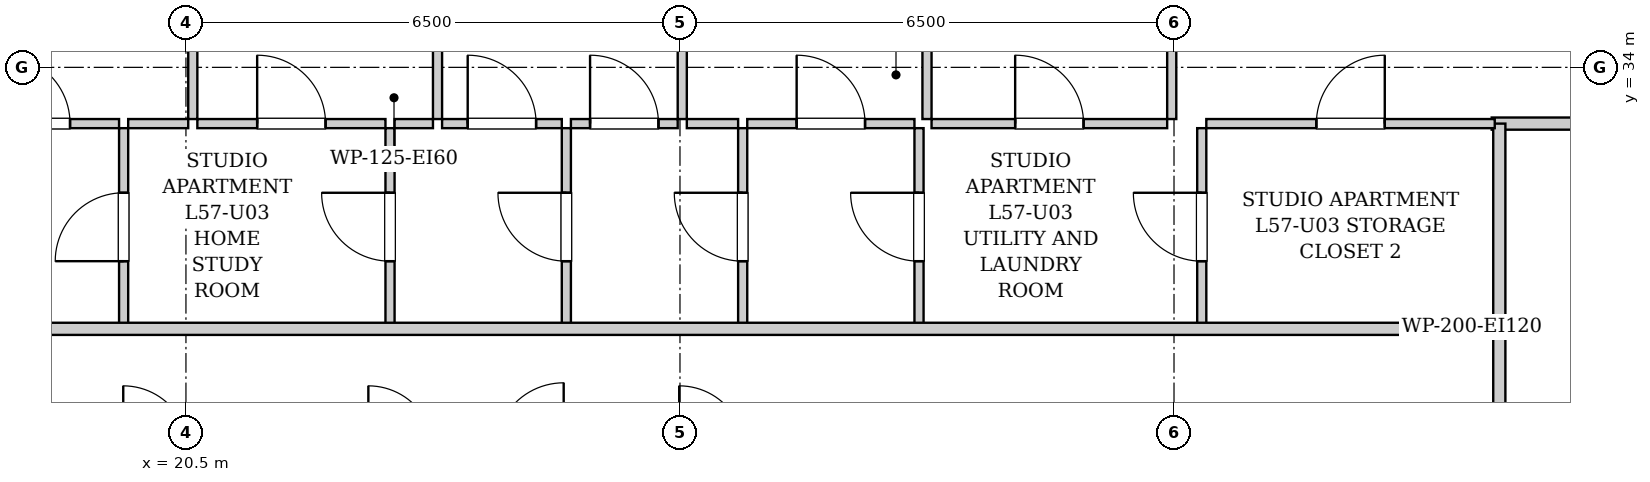
"""IFC4 building model, lengths in metres.
Left out: names, types, materials, properties, quantities, classifications, styles, units other than length and angle.
Written with IfcOpenShell. Run it as: python <this file> out.ifc"""

import sys

from ifc_helpers import new_model, si_unit, direction, frame, frame_2d, origin, place, context, subcontext, project, spatial, rectangle, extrude, element, fill, save


model = new_model("IFC4")
c1 = context("Model", 3, precision=1e-05, world=origin(), true_north=direction((0.0, 1.0)))
c2 = subcontext(c1, "Body", "Model", "MODEL_VIEW")
j1 = project(units=[si_unit("LENGTHUNIT", "METRE"), si_unit("PLANEANGLEUNIT", "RADIAN")], contexts=[c1])
p1 = place(None, origin())
s1 = spatial("IfcSite", under=j1, at=p1, CompositionType="ELEMENT")
p2 = place(p1, origin())
s2 = spatial("IfcBuilding", under=s1, at=p2, CompositionType="ELEMENT")
p3 = place(p2, frame((0.0, 0.0, 197.5)))
s3 = spatial("IfcBuildingStorey", under=s2, at=p3, CompositionType="ELEMENT", Elevation=197.5)
p4 = place(p3, frame((37.78, 28.98, 0.0), z_axis=(0.0, 0.0, 1.0), x_axis=(0.0, 1.0, 0.0)))
e1 = element("IfcWall", 1, at=p4, inside=s3, PredefinedType="PARTITIONING", context=c2, shape_type="SweptSolid", body=[
    extrude(rectangle(XDim=1.58, YDim=0.16, at=frame_2d((0.79, 0.0))), origin(), (0.0, 0.0, 1.0), 3.04),
])
p5 = place(p3, frame((37.68, 33.26, 0.0), z_axis=(0.0, 0.0, 1.0), x_axis=(1.0, 0.0, 0.0)))
e2 = element("IfcWall", 2, at=p5, inside=s3, PredefinedType="PARTITIONING", context=c2, shape_type="SweptSolid", body=[
    extrude(rectangle(XDim=2.34, YDim=0.16, at=frame_2d((1.17, 0.0))), origin(), (0.0, 0.0, 1.0), 3.04),
])
p6 = place(p3, frame((37.78, 30.6, 0.0), z_axis=(0.0, 0.0, 1.0), x_axis=(0.0, 1.0, 0.0)))
e3 = element("IfcWall", 3, at=p6, inside=s3, PredefinedType="PARTITIONING", context=c2, shape_type="SweptSolid", body=[
    extrude(rectangle(XDim=2.66, YDim=0.16, at=frame_2d((1.33, 0.0))), origin(), (0.0, 0.0, 1.0), 3.04),
])
p7 = place(p3, frame((19.68, 30.6, 0.0), z_axis=(0.0, 0.0, 1.0), x_axis=(0.0, 1.0, 0.0)))
e4 = element("IfcWall", 4, at=p7, inside=s3, PredefinedType="PARTITIONING", context=c2, shape_type="SweptSolid", body=[
    extrude(rectangle(XDim=2.6, YDim=0.12, at=frame_2d((1.3, 0.0))), origin(), (0.0, 0.0, 1.0), 3.04),
])
p8 = place(p7, frame((0.85, 0.0, 0.0)))
e5 = element("IfcOpeningElement", 5, at=p8, cuts=e4, PredefinedType="OPENING", context=c2, shape_type="SweptSolid", body=[
    extrude(rectangle(XDim=0.9, YDim=2.05, at=frame_2d((0.45, 1.025))), frame((0.0, 0.07, 0.0), z_axis=(0.0, -1.0, 0.0), x_axis=(1.0, 0.0, 0.0)), (0.0, 0.0, 1.0), 0.14),
])
p9 = place(p3, frame((17.43, 33.26, 0.0), z_axis=(0.0, 0.0, 1.0), x_axis=(1.0, 0.0, 0.0)))
e6 = element("IfcWall", 6, at=p9, inside=s3, PredefinedType="PARTITIONING", context=c2, shape_type="SweptSolid", body=[
    extrude(rectangle(XDim=2.19, YDim=0.12, at=frame_2d((1.095, 0.0))), origin(), (0.0, 0.0, 1.0), 3.04),
])
p10 = place(p9, frame((0.645, 0.0, 0.0)))
e7 = element("IfcOpeningElement", 7, at=p10, cuts=e6, PredefinedType="OPENING", context=c2, shape_type="SweptSolid", body=[
    extrude(rectangle(XDim=0.9, YDim=2.05, at=frame_2d((0.45, 1.025))), frame((0.0, 0.07, 0.0), z_axis=(0.0, -1.0, 0.0), x_axis=(1.0, 0.0, 0.0)), (0.0, 0.0, 1.0), 0.14),
])
p11 = place(p3, frame((23.185, 30.6, 0.0), z_axis=(0.0, 0.0, 1.0), x_axis=(0.0, 1.0, 0.0)))
e8 = element("IfcWall", 8, at=p11, inside=s3, PredefinedType="PARTITIONING", context=c2, shape_type="SweptSolid", body=[
    extrude(rectangle(XDim=2.6, YDim=0.12, at=frame_2d((1.3, 0.0))), origin(), (0.0, 0.0, 1.0), 3.04),
])
p12 = place(p11, frame((0.85, 0.0, 0.0)))
e9 = element("IfcOpeningElement", 9, at=p12, cuts=e8, PredefinedType="OPENING", context=c2, shape_type="SweptSolid", body=[
    extrude(rectangle(XDim=0.9, YDim=2.05, at=frame_2d((0.45, 1.025))), frame((0.0, 0.07, 0.0), z_axis=(0.0, -1.0, 0.0), x_axis=(1.0, 0.0, 0.0)), (0.0, 0.0, 1.0), 0.14),
])
p13 = place(p3, frame((19.74, 33.26, 0.0), z_axis=(0.0, 0.0, 1.0), x_axis=(1.0, 0.0, 0.0)))
e10 = element("IfcWall", 10, at=p13, inside=s3, PredefinedType="PARTITIONING", context=c2, shape_type="SweptSolid", body=[
    extrude(rectangle(XDim=0.79, YDim=0.12, at=frame_2d((0.395, 0.0))), origin(), (0.0, 0.0, 1.0), 3.04),
])
p14 = place(p3, frame((20.65, 33.26, 0.0), z_axis=(0.0, 0.0, 1.0), x_axis=(1.0, 0.0, 0.0)))
e11 = element("IfcWall", 11, at=p14, inside=s3, PredefinedType="PARTITIONING", context=c2, shape_type="SweptSolid", body=[
    extrude(rectangle(XDim=2.475, YDim=0.12, at=frame_2d((1.238, 0.0))), origin(), (0.0, 0.0, 1.0), 3.04),
])
p15 = place(p14, frame((0.787, 0.0, 0.0)))
e12 = element("IfcOpeningElement", 12, at=p15, cuts=e11, PredefinedType="OPENING", context=c2, shape_type="SweptSolid", body=[
    extrude(rectangle(XDim=0.9, YDim=2.05, at=frame_2d((0.45, 1.025))), frame((0.0, 0.07, 0.0), z_axis=(0.0, -1.0, 0.0), x_axis=(1.0, 0.0, 0.0)), (0.0, 0.0, 1.0), 0.14),
])
p16 = place(p3, frame((25.505, 30.6, 0.0), z_axis=(0.0, 0.0, 1.0), x_axis=(0.0, 1.0, 0.0)))
e13 = element("IfcWall", 13, at=p16, inside=s3, PredefinedType="PARTITIONING", context=c2, shape_type="SweptSolid", body=[
    extrude(rectangle(XDim=2.6, YDim=0.12, at=frame_2d((1.3, 0.0))), origin(), (0.0, 0.0, 1.0), 3.04),
])
p17 = place(p16, frame((0.85, 0.0, 0.0)))
e14 = element("IfcOpeningElement", 14, at=p17, cuts=e13, PredefinedType="OPENING", context=c2, shape_type="SweptSolid", body=[
    extrude(rectangle(XDim=0.9, YDim=2.05, at=frame_2d((0.45, 1.025))), frame((0.0, 0.07, 0.0), z_axis=(0.0, -1.0, 0.0), x_axis=(1.0, 0.0, 0.0)), (0.0, 0.0, 1.0), 0.14),
])
p18 = place(p3, frame((23.245, 33.26, 0.0), z_axis=(0.0, 0.0, 1.0), x_axis=(1.0, 0.0, 0.0)))
e15 = element("IfcWall", 15, at=p18, inside=s3, PredefinedType="PARTITIONING", context=c2, shape_type="SweptSolid", body=[
    extrude(rectangle(XDim=0.505, YDim=0.12, at=frame_2d((0.252, 0.0))), origin(), (0.0, 0.0, 1.0), 3.04),
])
p19 = place(p3, frame((23.87, 33.26, 0.0), z_axis=(0.0, 0.0, 1.0), x_axis=(1.0, 0.0, 0.0)))
e16 = element("IfcWall", 16, at=p19, inside=s3, PredefinedType="PARTITIONING", context=c2, shape_type="SweptSolid", body=[
    extrude(rectangle(XDim=1.575, YDim=0.12, at=frame_2d((0.788, 0.0))), origin(), (0.0, 0.0, 1.0), 3.04),
])
p20 = place(p19, frame((0.337, 0.0, 0.0)))
e17 = element("IfcOpeningElement", 17, at=p20, cuts=e16, PredefinedType="OPENING", context=c2, shape_type="SweptSolid", body=[
    extrude(rectangle(XDim=0.9, YDim=2.05, at=frame_2d((0.45, 1.025))), frame((0.0, 0.07, 0.0), z_axis=(0.0, -1.0, 0.0), x_axis=(1.0, 0.0, 0.0)), (0.0, 0.0, 1.0), 0.14),
])
p21 = place(p3, frame((27.825, 30.6, 0.0), z_axis=(0.0, 0.0, 1.0), x_axis=(0.0, 1.0, 0.0)))
e18 = element("IfcWall", 18, at=p21, inside=s3, PredefinedType="PARTITIONING", context=c2, shape_type="SweptSolid", body=[
    extrude(rectangle(XDim=2.6, YDim=0.12, at=frame_2d((1.3, 0.0))), origin(), (0.0, 0.0, 1.0), 3.04),
])
p22 = place(p21, frame((0.85, 0.0, 0.0)))
e19 = element("IfcOpeningElement", 19, at=p22, cuts=e18, PredefinedType="OPENING", context=c2, shape_type="SweptSolid", body=[
    extrude(rectangle(XDim=0.9, YDim=2.05, at=frame_2d((0.45, 1.025))), frame((0.0, 0.07, 0.0), z_axis=(0.0, -1.0, 0.0), x_axis=(1.0, 0.0, 0.0)), (0.0, 0.0, 1.0), 0.14),
])
p23 = place(p3, frame((25.565, 33.26, 0.0), z_axis=(0.0, 0.0, 1.0), x_axis=(1.0, 0.0, 0.0)))
e20 = element("IfcWall", 20, at=p23, inside=s3, PredefinedType="PARTITIONING", context=c2, shape_type="SweptSolid", body=[
    extrude(rectangle(XDim=1.405, YDim=0.12, at=frame_2d((0.703, 0.0))), origin(), (0.0, 0.0, 1.0), 3.04),
])
p24 = place(p23, frame((0.252, 0.0, 0.0)))
e21 = element("IfcOpeningElement", 21, at=p24, cuts=e20, PredefinedType="OPENING", context=c2, shape_type="SweptSolid", body=[
    extrude(rectangle(XDim=0.9, YDim=2.05, at=frame_2d((0.45, 1.025))), frame((0.0, 0.07, 0.0), z_axis=(0.0, -1.0, 0.0), x_axis=(1.0, 0.0, 0.0)), (0.0, 0.0, 1.0), 0.14),
])
p25 = place(p3, frame((27.09, 33.26, 0.0), z_axis=(0.0, 0.0, 1.0), x_axis=(1.0, 0.0, 0.0)))
e22 = element("IfcWall", 22, at=p25, inside=s3, PredefinedType="PARTITIONING", context=c2, shape_type="SweptSolid", body=[
    extrude(rectangle(XDim=0.675, YDim=0.12, at=frame_2d((0.337, 0.0))), origin(), (0.0, 0.0, 1.0), 3.04),
])
p26 = place(p3, frame((30.145, 30.6, 0.0), z_axis=(0.0, 0.0, 1.0), x_axis=(0.0, 1.0, 0.0)))
e23 = element("IfcWall", 23, at=p26, inside=s3, PredefinedType="PARTITIONING", context=c2, shape_type="SweptSolid", body=[
    extrude(rectangle(XDim=2.6, YDim=0.12, at=frame_2d((1.3, 0.0))), origin(), (0.0, 0.0, 1.0), 3.04),
])
p27 = place(p26, frame((0.85, 0.0, 0.0)))
e24 = element("IfcOpeningElement", 24, at=p27, cuts=e23, PredefinedType="OPENING", context=c2, shape_type="SweptSolid", body=[
    extrude(rectangle(XDim=0.9, YDim=2.05, at=frame_2d((0.45, 1.025))), frame((0.0, 0.07, 0.0), z_axis=(0.0, -1.0, 0.0), x_axis=(1.0, 0.0, 0.0)), (0.0, 0.0, 1.0), 0.14),
])
p28 = place(p3, frame((27.885, 33.26, 0.0), z_axis=(0.0, 0.0, 1.0), x_axis=(1.0, 0.0, 0.0)))
e25 = element("IfcWall", 25, at=p28, inside=s3, PredefinedType="PARTITIONING", context=c2, shape_type="SweptSolid", body=[
    extrude(rectangle(XDim=2.2, YDim=0.12, at=frame_2d((1.1, 0.0))), origin(), (0.0, 0.0, 1.0), 3.04),
])
p29 = place(p28, frame((0.65, 0.0, 0.0)))
e26 = element("IfcOpeningElement", 26, at=p29, cuts=e25, PredefinedType="OPENING", context=c2, shape_type="SweptSolid", body=[
    extrude(rectangle(XDim=0.9, YDim=2.05, at=frame_2d((0.45, 1.025))), frame((0.0, 0.07, 0.0), z_axis=(0.0, -1.0, 0.0), x_axis=(1.0, 0.0, 0.0)), (0.0, 0.0, 1.0), 0.14),
])
p30 = place(p3, frame((33.865, 30.6, 0.0), z_axis=(0.0, 0.0, 1.0), x_axis=(0.0, 1.0, 0.0)))
e27 = element("IfcWall", 27, at=p30, inside=s3, PredefinedType="PARTITIONING", context=c2, shape_type="SweptSolid", body=[
    extrude(rectangle(XDim=2.6, YDim=0.12, at=frame_2d((1.3, 0.0))), origin(), (0.0, 0.0, 1.0), 3.04),
])
p31 = place(p30, frame((0.85, 0.0, 0.0)))
e28 = element("IfcOpeningElement", 28, at=p31, cuts=e27, PredefinedType="OPENING", context=c2, shape_type="SweptSolid", body=[
    extrude(rectangle(XDim=0.9, YDim=2.05, at=frame_2d((0.45, 1.025))), frame((0.0, 0.07, 0.0), z_axis=(0.0, -1.0, 0.0), x_axis=(1.0, 0.0, 0.0)), (0.0, 0.0, 1.0), 0.14),
])
p32 = place(p3, frame((30.31, 33.26, 0.0), z_axis=(0.0, 0.0, 1.0), x_axis=(1.0, 0.0, 0.0)))
e29 = element("IfcWall", 29, at=p32, inside=s3, PredefinedType="PARTITIONING", context=c2, shape_type="SweptSolid", body=[
    extrude(rectangle(XDim=3.1, YDim=0.12, at=frame_2d((1.55, 0.0))), origin(), (0.0, 0.0, 1.0), 3.04),
])
p33 = place(p32, frame((1.1, 0.0, 0.0)))
e30 = element("IfcOpeningElement", 30, at=p33, cuts=e29, PredefinedType="OPENING", context=c2, shape_type="SweptSolid", body=[
    extrude(rectangle(XDim=0.9, YDim=2.05, at=frame_2d((0.45, 1.025))), frame((0.0, 0.07, 0.0), z_axis=(0.0, -1.0, 0.0), x_axis=(1.0, 0.0, 0.0)), (0.0, 0.0, 1.0), 0.14),
])
p34 = place(p3, frame((33.925, 33.26, 0.0), z_axis=(0.0, 0.0, 1.0), x_axis=(1.0, 0.0, 0.0)))
e31 = element("IfcWall", 31, at=p34, inside=s3, PredefinedType="PARTITIONING", context=c2, shape_type="SweptSolid", body=[
    extrude(rectangle(XDim=3.795, YDim=0.12, at=frame_2d((1.897, 0.0))), origin(), (0.0, 0.0, 1.0), 3.04),
])
p35 = place(p34, frame((1.448, 0.0, 0.0)))
e32 = element("IfcOpeningElement", 32, at=p35, cuts=e31, PredefinedType="OPENING", context=c2, shape_type="SweptSolid", body=[
    extrude(rectangle(XDim=0.9, YDim=2.05, at=frame_2d((0.45, 1.025))), frame((0.0, 0.07, 0.0), z_axis=(0.0, -1.0, 0.0), x_axis=(1.0, 0.0, 0.0)), (0.0, 0.0, 1.0), 0.14),
])
p36 = place(p3, frame((20.59, 33.32, 0.0), z_axis=(0.0, 0.0, 1.0), x_axis=(0.0, 1.0, 0.0)))
e33 = element("IfcWall", 33, at=p36, inside=s3, PredefinedType="PARTITIONING", context=c2, shape_type="SweptSolid", body=[
    extrude(rectangle(XDim=6.6, YDim=0.12, at=frame_2d((3.3, 0.0))), origin(), (0.0, 0.0, 1.0), 3.04),
])
p37 = place(p36, frame((2.835, 0.0, 0.0)))
e34 = element("IfcOpeningElement", 34, at=p37, cuts=e33, PredefinedType="OPENING", context=c2, shape_type="SweptSolid", body=[
    extrude(rectangle(XDim=0.9, YDim=2.05, at=frame_2d((0.45, 1.025))), frame((0.0, 0.07, 0.0), z_axis=(0.0, -1.0, 0.0), x_axis=(1.0, 0.0, 0.0)), (0.0, 0.0, 1.0), 0.14),
])
p38 = place(p3, frame((23.81, 33.32, 0.0), z_axis=(0.0, 0.0, 1.0), x_axis=(0.0, 1.0, 0.0)))
e35 = element("IfcWall", 35, at=p38, inside=s3, PredefinedType="PARTITIONING", context=c2, shape_type="SweptSolid", body=[
    extrude(rectangle(XDim=6.6, YDim=0.12, at=frame_2d((3.3, 0.0))), origin(), (0.0, 0.0, 1.0), 3.04),
])
p39 = place(p38, frame((2.835, 0.0, 0.0)))
e36 = element("IfcOpeningElement", 36, at=p39, cuts=e35, PredefinedType="OPENING", context=c2, shape_type="SweptSolid", body=[
    extrude(rectangle(XDim=0.9, YDim=2.05, at=frame_2d((0.45, 1.025))), frame((0.0, 0.07, 0.0), z_axis=(0.0, -1.0, 0.0), x_axis=(1.0, 0.0, 0.0)), (0.0, 0.0, 1.0), 0.14),
])
p40 = place(p3, frame((27.03, 33.32, 0.0), z_axis=(0.0, 0.0, 1.0), x_axis=(0.0, 1.0, 0.0)))
e37 = element("IfcWall", 37, at=p40, inside=s3, PredefinedType="PARTITIONING", context=c2, shape_type="SweptSolid", body=[
    extrude(rectangle(XDim=6.6, YDim=0.12, at=frame_2d((3.3, 0.0))), origin(), (0.0, 0.0, 1.0), 3.04),
])
p41 = place(p40, frame((2.835, 0.0, 0.0)))
e38 = element("IfcOpeningElement", 38, at=p41, cuts=e37, PredefinedType="OPENING", context=c2, shape_type="SweptSolid", body=[
    extrude(rectangle(XDim=0.9, YDim=2.05, at=frame_2d((0.45, 1.025))), frame((0.0, 0.07, 0.0), z_axis=(0.0, -1.0, 0.0), x_axis=(1.0, 0.0, 0.0)), (0.0, 0.0, 1.0), 0.14),
])
p42 = place(p3, frame((30.25, 33.32, 0.0), z_axis=(0.0, 0.0, 1.0), x_axis=(0.0, 1.0, 0.0)))
e39 = element("IfcWall", 39, at=p42, inside=s3, PredefinedType="PARTITIONING", context=c2, shape_type="SweptSolid", body=[
    extrude(rectangle(XDim=6.6, YDim=0.12, at=frame_2d((3.3, 0.0))), origin(), (0.0, 0.0, 1.0), 3.04),
])
p43 = place(p42, frame((2.835, 0.0, 0.0)))
e40 = element("IfcOpeningElement", 40, at=p43, cuts=e39, PredefinedType="OPENING", context=c2, shape_type="SweptSolid", body=[
    extrude(rectangle(XDim=0.9, YDim=2.05, at=frame_2d((0.45, 1.025))), frame((0.0, 0.07, 0.0), z_axis=(0.0, -1.0, 0.0), x_axis=(1.0, 0.0, 0.0)), (0.0, 0.0, 1.0), 0.14),
])
p44 = place(p3, frame((33.47, 33.32, 0.0), z_axis=(0.0, 0.0, 1.0), x_axis=(0.0, 1.0, 0.0)))
e41 = element("IfcWall", 41, at=p44, inside=s3, PredefinedType="PARTITIONING", context=c2, shape_type="SweptSolid", body=[
    extrude(rectangle(XDim=4.45, YDim=0.12, at=frame_2d((2.225, 0.0))), origin(), (0.0, 0.0, 1.0), 3.04),
])
p45 = place(p44, frame((1.775, 0.0, 0.0)))
e42 = element("IfcOpeningElement", 42, at=p45, cuts=e41, PredefinedType="OPENING", context=c2, shape_type="SweptSolid", body=[
    extrude(rectangle(XDim=0.9, YDim=2.05, at=frame_2d((0.45, 1.025))), frame((0.0, 0.07, 0.0), z_axis=(0.0, -1.0, 0.0), x_axis=(1.0, 0.0, 0.0)), (0.0, 0.0, 1.0), 0.14),
])
p46 = place(p3, frame((13.15, 30.56, 0.0), z_axis=(0.0, 0.0, 1.0), x_axis=(1.0, 0.0, 0.0)))
e43 = element("IfcWall", 43, at=p46, inside=s3, PredefinedType="PARTITIONING", context=c2, shape_type="SweptSolid", body=[
    extrude(rectangle(XDim=24.6, YDim=0.16, at=frame_2d((12.3, 0.0))), origin(), (0.0, 0.0, 1.0), 3.04),
])
p47 = place(p46, frame((3.115, 0.0, 0.0)))
e44 = element("IfcOpeningElement", 44, at=p47, cuts=e43, PredefinedType="OPENING", context=c2, shape_type="SweptSolid", body=[
    extrude(rectangle(XDim=0.95, YDim=2.1, at=frame_2d((0.475, 1.05))), frame((0.0, 0.09, 0.0), z_axis=(0.0, -1.0, 0.0), x_axis=(1.0, 0.0, 0.0)), (0.0, 0.0, 1.0), 0.18),
])
p48 = place(p8, origin())
e45 = element("IfcDoor", 45, at=p48, inside=s3, OperationType="SINGLE_SWING_LEFT", PredefinedType="DOOR", context=c2, shape_type="SweptSolid", body=[
    extrude(rectangle(XDim=0.9, YDim=2.05, at=frame_2d((0.45, 1.025))), frame((0.0, 0.025, 0.0), z_axis=(0.0, -1.0, 0.0), x_axis=(1.0, 0.0, 0.0)), (0.0, 0.0, 1.0), 0.05),
])
fill(e5, e45)
p49 = place(p10, origin())
e46 = element("IfcDoor", 46, at=p49, inside=s3, OperationType="SINGLE_SWING_LEFT", PredefinedType="DOOR", context=c2, shape_type="SweptSolid", body=[
    extrude(rectangle(XDim=0.9, YDim=2.05, at=frame_2d((0.45, 1.025))), frame((0.0, 0.025, 0.0), z_axis=(0.0, -1.0, 0.0), x_axis=(1.0, 0.0, 0.0)), (0.0, 0.0, 1.0), 0.05),
])
fill(e7, e46)
p50 = place(p12, origin())
e47 = element("IfcDoor", 47, at=p50, inside=s3, OperationType="SINGLE_SWING_RIGHT", PredefinedType="DOOR", context=c2, shape_type="SweptSolid", body=[
    extrude(rectangle(XDim=0.9, YDim=2.05, at=frame_2d((0.45, 1.025))), frame((0.0, 0.025, 0.0), z_axis=(0.0, -1.0, 0.0), x_axis=(1.0, 0.0, 0.0)), (0.0, 0.0, 1.0), 0.05),
])
fill(e9, e47)
p51 = place(p15, origin())
e48 = element("IfcDoor", 48, at=p51, inside=s3, OperationType="SINGLE_SWING_LEFT", PredefinedType="DOOR", context=c2, shape_type="SweptSolid", body=[
    extrude(rectangle(XDim=0.9, YDim=2.05, at=frame_2d((0.45, 1.025))), frame((0.0, 0.025, 0.0), z_axis=(0.0, -1.0, 0.0), x_axis=(1.0, 0.0, 0.0)), (0.0, 0.0, 1.0), 0.05),
])
fill(e12, e48)
p52 = place(p17, origin())
e49 = element("IfcDoor", 49, at=p52, inside=s3, OperationType="SINGLE_SWING_RIGHT", PredefinedType="DOOR", context=c2, shape_type="SweptSolid", body=[
    extrude(rectangle(XDim=0.9, YDim=2.05, at=frame_2d((0.45, 1.025))), frame((0.0, 0.025, 0.0), z_axis=(0.0, -1.0, 0.0), x_axis=(1.0, 0.0, 0.0)), (0.0, 0.0, 1.0), 0.05),
])
fill(e14, e49)
p53 = place(p20, origin())
e50 = element("IfcDoor", 50, at=p53, inside=s3, OperationType="SINGLE_SWING_LEFT", PredefinedType="DOOR", context=c2, shape_type="SweptSolid", body=[
    extrude(rectangle(XDim=0.9, YDim=2.05, at=frame_2d((0.45, 1.025))), frame((0.0, 0.025, 0.0), z_axis=(0.0, -1.0, 0.0), x_axis=(1.0, 0.0, 0.0)), (0.0, 0.0, 1.0), 0.05),
])
fill(e17, e50)
p54 = place(p22, origin())
e51 = element("IfcDoor", 51, at=p54, inside=s3, OperationType="SINGLE_SWING_RIGHT", PredefinedType="DOOR", context=c2, shape_type="SweptSolid", body=[
    extrude(rectangle(XDim=0.9, YDim=2.05, at=frame_2d((0.45, 1.025))), frame((0.0, 0.025, 0.0), z_axis=(0.0, -1.0, 0.0), x_axis=(1.0, 0.0, 0.0)), (0.0, 0.0, 1.0), 0.05),
])
fill(e19, e51)
p55 = place(p24, origin())
e52 = element("IfcDoor", 52, at=p55, inside=s3, OperationType="SINGLE_SWING_LEFT", PredefinedType="DOOR", context=c2, shape_type="SweptSolid", body=[
    extrude(rectangle(XDim=0.9, YDim=2.05, at=frame_2d((0.45, 1.025))), frame((0.0, 0.025, 0.0), z_axis=(0.0, -1.0, 0.0), x_axis=(1.0, 0.0, 0.0)), (0.0, 0.0, 1.0), 0.05),
])
fill(e21, e52)
p56 = place(p27, origin())
e53 = element("IfcDoor", 53, at=p56, inside=s3, OperationType="SINGLE_SWING_RIGHT", PredefinedType="DOOR", context=c2, shape_type="SweptSolid", body=[
    extrude(rectangle(XDim=0.9, YDim=2.05, at=frame_2d((0.45, 1.025))), frame((0.0, 0.025, 0.0), z_axis=(0.0, -1.0, 0.0), x_axis=(1.0, 0.0, 0.0)), (0.0, 0.0, 1.0), 0.05),
])
fill(e24, e53)
p57 = place(p29, origin())
e54 = element("IfcDoor", 54, at=p57, inside=s3, OperationType="SINGLE_SWING_LEFT", PredefinedType="DOOR", context=c2, shape_type="SweptSolid", body=[
    extrude(rectangle(XDim=0.9, YDim=2.05, at=frame_2d((0.45, 1.025))), frame((0.0, 0.025, 0.0), z_axis=(0.0, -1.0, 0.0), x_axis=(1.0, 0.0, 0.0)), (0.0, 0.0, 1.0), 0.05),
])
fill(e26, e54)
p58 = place(p31, origin())
e55 = element("IfcDoor", 55, at=p58, inside=s3, OperationType="SINGLE_SWING_RIGHT", PredefinedType="DOOR", context=c2, shape_type="SweptSolid", body=[
    extrude(rectangle(XDim=0.9, YDim=2.05, at=frame_2d((0.45, 1.025))), frame((0.0, 0.025, 0.0), z_axis=(0.0, -1.0, 0.0), x_axis=(1.0, 0.0, 0.0)), (0.0, 0.0, 1.0), 0.05),
])
fill(e28, e55)
p59 = place(p33, origin())
e56 = element("IfcDoor", 56, at=p59, inside=s3, OperationType="SINGLE_SWING_LEFT", PredefinedType="DOOR", context=c2, shape_type="SweptSolid", body=[
    extrude(rectangle(XDim=0.9, YDim=2.05, at=frame_2d((0.45, 1.025))), frame((0.0, 0.025, 0.0), z_axis=(0.0, -1.0, 0.0), x_axis=(1.0, 0.0, 0.0)), (0.0, 0.0, 1.0), 0.05),
])
fill(e30, e56)
p60 = place(p35, origin())
e57 = element("IfcDoor", 57, at=p60, inside=s3, OperationType="SINGLE_SWING_RIGHT", PredefinedType="DOOR", context=c2, shape_type="SweptSolid", body=[
    extrude(rectangle(XDim=0.9, YDim=2.05, at=frame_2d((0.45, 1.025))), frame((0.0, 0.025, 0.0), z_axis=(0.0, -1.0, 0.0), x_axis=(1.0, 0.0, 0.0)), (0.0, 0.0, 1.0), 0.05),
])
fill(e32, e57)
save(model, sys.argv[1])
